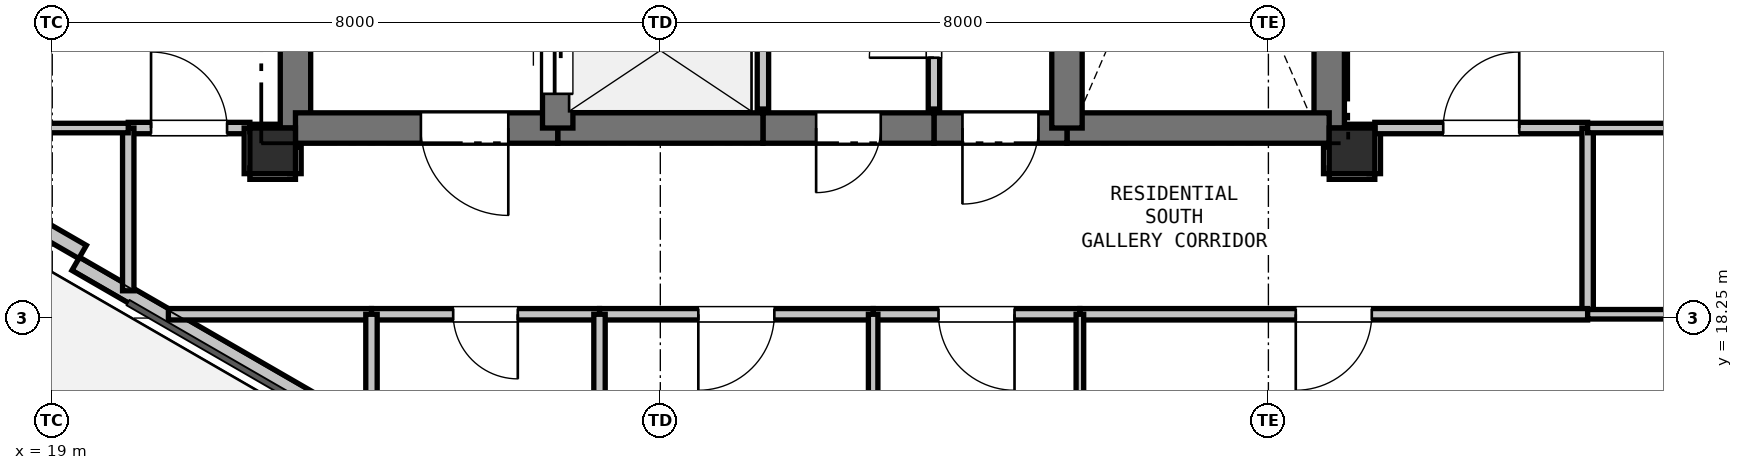
"""IFC4 building model, lengths in metres.
Left out: names, types, materials, properties, quantities, classifications, styles, units other than length and angle.
Written with IfcOpenShell. Run it as: python <this file> out.ifc"""

import sys

from ifc_helpers import new_model, si_unit, direction, frame, frame_2d, origin, origin_2d, place, context, subcontext, project, spatial, rectangle, extrude, element, fill, save


model = new_model("IFC4")
c1 = context("Model", 3, precision=1e-05, world=origin(), true_north=direction((0.0, 1.0)))
c2 = subcontext(c1, "Body", "Model", "MODEL_VIEW")
j1 = project(units=[si_unit("LENGTHUNIT", "METRE"), si_unit("PLANEANGLEUNIT", "RADIAN")], contexts=[c1])
p1 = place(None, origin())
s1 = spatial("IfcSite", under=j1, at=p1, CompositionType="ELEMENT")
p2 = place(p1, origin())
s2 = spatial("IfcBuilding", under=s1, at=p2, CompositionType="ELEMENT")
p3 = place(p2, frame((0.0, 0.0, 211.8)))
s3 = spatial("IfcBuildingStorey", under=s2, at=p3, CompositionType="ELEMENT", Elevation=211.8)
for number, where, z_axis, x_axis in (
    (1, (21.9, 20.45, 0.0), (0.0, 0.0, 1.0), (1.0, 0.0, 0.0)),
    (2, (36.1, 20.45, 0.0), (0.0, 0.0, 1.0), (1.0, 0.0, 0.0)),
):
    element("IfcColumn", number, at=place(p3, frame(where, z_axis=z_axis, x_axis=x_axis)), inside=s3, PredefinedType="COLUMN", context=c2, shape_type="SweptSolid", body=[
        extrude(rectangle(XDim=0.6, YDim=0.6, at=origin_2d()), origin(), (0.0, 0.0, 1.0), 3.3),
    ])
p4 = place(p3, frame((27.102, 14.464, 0.0), z_axis=(0.0, 0.0, 1.0), x_axis=(-0.866020680503, 0.500008180874, 0.0)))
e3 = element("IfcWall", 3, at=p4, inside=s3, PredefinedType="PARAPET", context=c2, shape_type="SweptSolid", body=[
    extrude(rectangle(XDim=8.999, YDim=0.2, at=frame_2d((4.5, 0.0))), origin(), (0.0, 0.0, 1.0), 0.2),
])
p5 = place(p3, frame((19.399, 19.12, 0.0), z_axis=(0.0, 0.0, 1.0), x_axis=(-0.86605165483, 0.499954529098, 0.0)))
e4 = element("IfcWall", 4, at=p5, inside=s3, PredefinedType="PARAPET", context=c2, shape_type="SweptSolid", body=[
    extrude(rectangle(XDim=1.7, YDim=0.2, at=frame_2d((0.85, 0.0))), origin(), (0.0, 0.0, 1.0), 2.69),
])
p6 = place(p3, frame((22.2, 20.75, 0.0), z_axis=(0.0, 0.0, 1.0), x_axis=(0.0, 1.0, 0.0)))
e5 = element("IfcWall", 5, at=p6, inside=s3, PredefinedType="SHEAR", context=c2, shape_type="SweptSolid", body=[
    extrude(rectangle(XDim=4.65, YDim=0.4, at=frame_2d((2.325, 0.0))), origin(), (0.0, 0.0, 1.0), 3.07),
])
p7 = place(p3, frame((35.8, 28.1, 0.0), z_axis=(0.0, 0.0, 1.0), x_axis=(0.0, -1.0, 0.0)))
e6 = element("IfcWall", 6, at=p7, inside=s3, PredefinedType="SHEAR", context=c2, shape_type="SweptSolid", body=[
    extrude(rectangle(XDim=7.35, YDim=0.4, at=frame_2d((3.675, 0.0))), origin(), (0.0, 0.0, 1.0), 3.07),
])
p8 = place(p3, frame((35.8, 20.75, 0.0), z_axis=(0.0, 0.0, 1.0), x_axis=(-1.0, 0.0, 0.0)))
e7 = element("IfcWall", 7, at=p8, inside=s3, PredefinedType="SHEAR", context=c2, shape_type="SweptSolid", body=[
    extrude(rectangle(XDim=3.45, YDim=0.4, at=frame_2d((1.725, 0.0))), origin(), (0.0, 0.0, 1.0), 3.07),
])
p9 = place(p3, frame((32.35, 20.75, 0.0), z_axis=(0.0, 0.0, 1.0), x_axis=(-1.0, 0.0, 0.0)))
e8 = element("IfcWall", 8, at=p9, inside=s3, PredefinedType="SHEAR", context=c2, shape_type="SweptSolid", body=[
    extrude(rectangle(XDim=1.75, YDim=0.4, at=frame_2d((0.875, 0.0))), origin(), (0.0, 0.0, 1.0), 3.07),
])
p10 = place(p9, frame((0.375, 0.0, 0.0)))
e9 = element("IfcOpeningElement", 9, at=p10, cuts=e8, PredefinedType="OPENING", context=c2, shape_type="SweptSolid", body=[
    extrude(rectangle(XDim=1.0, YDim=2.15, at=frame_2d((0.5, 1.075))), frame((0.0, 0.21, 0.0), z_axis=(0.0, -1.0, 0.0), x_axis=(1.0, 0.0, 0.0)), (0.0, 0.0, 1.0), 0.42),
])
p11 = place(p3, frame((30.6, 20.75, 0.0), z_axis=(0.0, 0.0, 1.0), x_axis=(-1.0, 0.0, 0.0)))
e10 = element("IfcWall", 10, at=p11, inside=s3, PredefinedType="SHEAR", context=c2, shape_type="SweptSolid", body=[
    extrude(rectangle(XDim=2.25, YDim=0.4, at=frame_2d((1.125, 0.0))), origin(), (0.0, 0.0, 1.0), 3.07),
])
p12 = place(p11, frame((0.7, 0.0, 0.0)))
e11 = element("IfcOpeningElement", 11, at=p12, cuts=e10, PredefinedType="OPENING", context=c2, shape_type="SweptSolid", body=[
    extrude(rectangle(XDim=0.85, YDim=2.1, at=frame_2d((0.425, 1.05))), frame((0.0, 0.21, 0.0), z_axis=(0.0, -1.0, 0.0), x_axis=(1.0, 0.0, 0.0)), (0.0, 0.0, 1.0), 0.42),
])
p13 = place(p3, frame((28.35, 20.75, 0.0), z_axis=(0.0, 0.0, 1.0), x_axis=(-1.0, 0.0, 0.0)))
e12 = element("IfcWall", 12, at=p13, inside=s3, PredefinedType="SHEAR", context=c2, shape_type="SweptSolid", body=[
    extrude(rectangle(XDim=2.7, YDim=0.4, at=frame_2d((1.35, 0.0))), origin(), (0.0, 0.0, 1.0), 3.07),
])
p14 = place(p3, frame((25.65, 20.75, 0.0), z_axis=(0.0, 0.0, 1.0), x_axis=(-1.0, 0.0, 0.0)))
e13 = element("IfcWall", 13, at=p14, inside=s3, PredefinedType="SHEAR", context=c2, shape_type="SweptSolid", body=[
    extrude(rectangle(XDim=3.45, YDim=0.4, at=frame_2d((1.725, 0.0))), origin(), (0.0, 0.0, 1.0), 3.07),
])
p15 = place(p14, frame((0.65, 0.0, 0.0)))
e14 = element("IfcOpeningElement", 14, at=p15, cuts=e13, PredefinedType="OPENING", context=c2, shape_type="SweptSolid", body=[
    extrude(rectangle(XDim=1.15, YDim=2.15, at=frame_2d((0.575, 1.075))), frame((0.0, 0.21, 0.0), z_axis=(0.0, -1.0, 0.0), x_axis=(1.0, 0.0, 0.0)), (0.0, 0.0, 1.0), 0.42),
])
p16 = place(p3, frame((25.65, 20.75, 0.0), z_axis=(0.0, 0.0, 1.0), x_axis=(0.0, 1.0, 0.0)))
e15 = element("IfcWall", 15, at=p16, inside=s3, PredefinedType="SHEAR", context=c2, shape_type="SweptSolid", body=[
    extrude(rectangle(XDim=2.0, YDim=0.4, at=frame_2d((1.0, 0.0))), origin(), (0.0, 0.0, 1.0), 3.07),
])
p17 = place(p16, frame((0.45, 0.0, 0.0)))
e16 = element("IfcOpeningElement", 16, at=p17, cuts=e15, PredefinedType="OPENING", context=c2, shape_type="SweptSolid", body=[
    extrude(rectangle(XDim=1.1, YDim=2.15, at=frame_2d((0.55, 1.075))), frame((0.0, 0.21, 0.0), z_axis=(0.0, -1.0, 0.0), x_axis=(1.0, 0.0, 0.0)), (0.0, 0.0, 1.0), 0.42),
])
p18 = place(p3, frame((32.35, 20.75, 0.0), z_axis=(0.0, 0.0, 1.0), x_axis=(0.0, 1.0, 0.0)))
e17 = element("IfcWall", 17, at=p18, inside=s3, PredefinedType="SHEAR", context=c2, shape_type="SweptSolid", body=[
    extrude(rectangle(XDim=4.8, YDim=0.4, at=frame_2d((2.4, 0.0))), origin(), (0.0, 0.0, 1.0), 3.07),
])
p19 = place(p3, frame((28.35, 23.2, 0.0), z_axis=(0.0, 0.0, 1.0), x_axis=(0.0, -1.0, 0.0)))
e18 = element("IfcWall", 18, at=p19, inside=s3, PredefinedType="PARTITIONING", context=c2, shape_type="SweptSolid", body=[
    extrude(rectangle(XDim=2.2, YDim=0.15, at=frame_2d((1.1, 0.0))), origin(), (0.0, 0.0, 1.0), 3.07),
])
p20 = place(p3, frame((30.6, 21.0, 0.0), z_axis=(0.0, 0.0, 1.0), x_axis=(0.0, 1.0, 0.0)))
e19 = element("IfcWall", 19, at=p20, inside=s3, PredefinedType="PARTITIONING", context=c2, shape_type="SweptSolid", body=[
    extrude(rectangle(XDim=2.2, YDim=0.15, at=frame_2d((1.1, 0.0))), origin(), (0.0, 0.0, 1.0), 3.07),
])
p21 = place(p20, frame((0.675, 0.0, 0.0)))
e20 = element("IfcOpeningElement", 20, at=p21, cuts=e19, PredefinedType="OPENING", context=c2, shape_type="SweptSolid", body=[
    extrude(rectangle(XDim=0.85, YDim=2.1, at=frame_2d((0.425, 1.05))), frame((0.0, 0.085, 0.0), z_axis=(0.0, -1.0, 0.0), x_axis=(1.0, 0.0, 0.0)), (0.0, 0.0, 1.0), 0.17),
])
p22 = place(p3, frame((20.0, 20.75, 0.0), z_axis=(0.0, 0.0, 1.0), x_axis=(1.0, 0.0, 0.0)))
e21 = element("IfcWall", 21, at=p22, inside=s3, PredefinedType="PARTITIONING", context=c2, shape_type="SweptSolid", body=[
    extrude(rectangle(XDim=1.6, YDim=0.15, at=frame_2d((0.8, 0.0))), origin(), (0.0, 0.0, 1.0), 2.518),
])
p23 = place(p22, frame((0.3, 0.0, 0.0)))
e22 = element("IfcOpeningElement", 22, at=p23, cuts=e21, PredefinedType="OPENING", context=c2, shape_type="SweptSolid", body=[
    extrude(rectangle(XDim=1.0, YDim=2.15, at=frame_2d((0.5, 1.075))), frame((0.0, 0.085, 0.0), z_axis=(0.0, -1.0, 0.0), x_axis=(1.0, 0.0, 0.0)), (0.0, 0.0, 1.0), 0.17),
])
p24 = place(p3, frame((21.6, 20.75, 0.0), z_axis=(0.0, 0.0, 1.0), x_axis=(0.0, -1.0, 0.0)))
e23 = element("IfcWall", 23, at=p24, inside=s3, PredefinedType="PARTITIONING", context=c2, shape_type="SweptSolid", body=[
    extrude(rectangle(XDim=0.6, YDim=0.15, at=frame_2d((0.3, 0.0))), origin(), (0.0, 0.0, 1.0), 2.518),
])
p25 = place(p3, frame((21.6, 20.15, 0.0), z_axis=(0.0, 0.0, 1.0), x_axis=(1.0, 0.0, 0.0)))
e24 = element("IfcWall", 24, at=p25, inside=s3, PredefinedType="PARTITIONING", context=c2, shape_type="SweptSolid", body=[
    extrude(rectangle(XDim=0.6, YDim=0.15, at=frame_2d((0.3, 0.0))), origin(), (0.0, 0.0, 1.0), 2.518),
])
p26 = place(p3, frame((22.2, 20.15, 0.0), z_axis=(0.0, 0.0, 1.0), x_axis=(0.0, 1.0, 0.0)))
e25 = element("IfcWall", 25, at=p26, inside=s3, PredefinedType="PARTITIONING", context=c2, shape_type="SweptSolid", body=[
    extrude(rectangle(XDim=0.35, YDim=0.15, at=frame_2d((0.175, 0.0))), origin(), (0.0, 0.0, 1.0), 2.518),
])
p27 = place(p3, frame((35.8, 20.5, 0.0), z_axis=(0.0, 0.0, 1.0), x_axis=(0.0, -1.0, 0.0)))
e26 = element("IfcWall", 26, at=p27, inside=s3, PredefinedType="PARTITIONING", context=c2, shape_type="SweptSolid", body=[
    extrude(rectangle(XDim=0.35, YDim=0.15, at=frame_2d((0.175, 0.0))), origin(), (0.0, 0.0, 1.0), 2.595),
])
p28 = place(p3, frame((35.8, 20.15, 0.0), z_axis=(0.0, 0.0, 1.0), x_axis=(1.0, 0.0, 0.0)))
e27 = element("IfcWall", 27, at=p28, inside=s3, PredefinedType="PARTITIONING", context=c2, shape_type="SweptSolid", body=[
    extrude(rectangle(XDim=0.6, YDim=0.15, at=frame_2d((0.3, 0.0))), origin(), (0.0, 0.0, 1.0), 2.518),
])
p29 = place(p3, frame((36.4, 20.15, 0.0), z_axis=(0.0, 0.0, 1.0), x_axis=(0.0, 1.0, 0.0)))
e28 = element("IfcWall", 28, at=p29, inside=s3, PredefinedType="PARTITIONING", context=c2, shape_type="SweptSolid", body=[
    extrude(rectangle(XDim=0.6, YDim=0.15, at=frame_2d((0.3, 0.0))), origin(), (0.0, 0.0, 1.0), 2.518),
])
p30 = place(p3, frame((36.4, 20.75, 0.0), z_axis=(0.0, 0.0, 1.0), x_axis=(1.0, 0.0, 0.0)))
e29 = element("IfcWall", 29, at=p30, inside=s3, PredefinedType="PARTITIONING", context=c2, shape_type="SweptSolid", body=[
    extrude(rectangle(XDim=2.8, YDim=0.15, at=frame_2d((1.4, 0.0))), origin(), (0.0, 0.0, 1.0), 3.07),
])
p31 = place(p30, frame((0.9, 0.0, 0.0)))
e30 = element("IfcOpeningElement", 30, at=p31, cuts=e29, PredefinedType="OPENING", context=c2, shape_type="SweptSolid", body=[
    extrude(rectangle(XDim=1.0, YDim=2.15, at=frame_2d((0.5, 1.075))), frame((0.0, 0.085, 0.0), z_axis=(0.0, -1.0, 0.0), x_axis=(1.0, 0.0, 0.0)), (0.0, 0.0, 1.0), 0.17),
])
p32 = place(p3, frame((39.2, 20.75, 0.0), z_axis=(0.0, 0.0, 1.0), x_axis=(0.0, -1.0, 0.0)))
e31 = element("IfcWall", 31, at=p32, inside=s3, PredefinedType="PARTITIONING", context=c2, shape_type="SweptSolid", body=[
    extrude(rectangle(XDim=2.45, YDim=0.15, at=frame_2d((1.225, 0.0))), origin(), (0.0, 0.0, 1.0), 3.07),
])
p33 = place(p3, frame((39.2, 18.3, 0.0), z_axis=(0.0, 0.0, 1.0), x_axis=(-1.0, 0.0, 0.0)))
e32 = element("IfcWall", 32, at=p33, inside=s3, PredefinedType="PARTITIONING", context=c2, shape_type="SweptSolid", body=[
    extrude(rectangle(XDim=6.68, YDim=0.15, at=frame_2d((3.34, 0.0))), origin(), (0.0, 0.0, 1.0), 2.518),
])
p34 = place(p33, frame((2.84, 0.0, 0.0)))
e33 = element("IfcOpeningElement", 33, at=p34, cuts=e32, PredefinedType="OPENING", context=c2, shape_type="SweptSolid", body=[
    extrude(rectangle(XDim=1.0, YDim=2.15, at=frame_2d((0.5, 1.075))), frame((0.0, 0.085, 0.0), z_axis=(0.0, -1.0, 0.0), x_axis=(1.0, 0.0, 0.0)), (0.0, 0.0, 1.0), 0.17),
])
p35 = place(p3, frame((32.52, 18.3, 0.0), z_axis=(0.0, 0.0, 1.0), x_axis=(-1.0, 0.0, 0.0)))
e34 = element("IfcWall", 34, at=p35, inside=s3, PredefinedType="PARTITIONING", context=c2, shape_type="SweptSolid", body=[
    extrude(rectangle(XDim=2.72, YDim=0.15, at=frame_2d((1.36, 0.0))), origin(), (0.0, 0.0, 1.0), 3.07),
])
p36 = place(p35, frame((0.86, 0.0, 0.0)))
e35 = element("IfcOpeningElement", 35, at=p36, cuts=e34, PredefinedType="OPENING", context=c2, shape_type="SweptSolid", body=[
    extrude(rectangle(XDim=1.0, YDim=2.15, at=frame_2d((0.5, 1.075))), frame((0.0, 0.085, 0.0), z_axis=(0.0, -1.0, 0.0), x_axis=(1.0, 0.0, 0.0)), (0.0, 0.0, 1.0), 0.17),
])
p37 = place(p3, frame((29.8, 18.3, 0.0), z_axis=(0.0, 0.0, 1.0), x_axis=(-1.0, 0.0, 0.0)))
e36 = element("IfcWall", 36, at=p37, inside=s3, PredefinedType="PARTITIONING", context=c2, shape_type="SweptSolid", body=[
    extrude(rectangle(XDim=3.6, YDim=0.15, at=frame_2d((1.8, 0.0))), origin(), (0.0, 0.0, 1.0), 3.07),
])
p38 = place(p37, frame((1.3, 0.0, 0.0)))
e37 = element("IfcOpeningElement", 37, at=p38, cuts=e36, PredefinedType="OPENING", context=c2, shape_type="SweptSolid", body=[
    extrude(rectangle(XDim=1.0, YDim=2.15, at=frame_2d((0.5, 1.075))), frame((0.0, 0.085, 0.0), z_axis=(0.0, -1.0, 0.0), x_axis=(1.0, 0.0, 0.0)), (0.0, 0.0, 1.0), 0.17),
])
p39 = place(p3, frame((26.2, 18.3, 0.0), z_axis=(0.0, 0.0, 1.0), x_axis=(-1.0, 0.0, 0.0)))
e38 = element("IfcWall", 38, at=p39, inside=s3, PredefinedType="PARTITIONING", context=c2, shape_type="SweptSolid", body=[
    extrude(rectangle(XDim=3.0, YDim=0.15, at=frame_2d((1.5, 0.0))), origin(), (0.0, 0.0, 1.0), 2.518),
])
p40 = place(p39, frame((1.075, 0.0, 0.0)))
e39 = element("IfcOpeningElement", 39, at=p40, cuts=e38, PredefinedType="OPENING", context=c2, shape_type="SweptSolid", body=[
    extrude(rectangle(XDim=0.85, YDim=2.1, at=frame_2d((0.425, 1.05))), frame((0.0, 0.085, 0.0), z_axis=(0.0, -1.0, 0.0), x_axis=(1.0, 0.0, 0.0)), (0.0, 0.0, 1.0), 0.17),
])
p41 = place(p3, frame((23.2, 18.3, 0.0), z_axis=(0.0, 0.0, 1.0), x_axis=(-1.0, 0.0, 0.0)))
e40 = element("IfcWall", 40, at=p41, inside=s3, PredefinedType="PARTITIONING", context=c2, shape_type="SweptSolid", body=[
    extrude(rectangle(XDim=2.672, YDim=0.15, at=frame_2d((1.336, 0.0))), origin(), (0.0, 0.0, 1.0), 2.365),
])
p42 = place(p3, frame((20.0, 18.609, 0.0), z_axis=(0.0, 0.0, 1.0), x_axis=(0.0, 1.0, 0.0)))
e41 = element("IfcWall", 41, at=p42, inside=s3, PredefinedType="PARTITIONING", context=c2, shape_type="SweptSolid", body=[
    extrude(rectangle(XDim=2.141, YDim=0.15, at=frame_2d((1.071, 0.0))), origin(), (0.0, 0.0, 1.0), 2.365),
])
p43 = place(p3, frame((21.95, 20.75, 0.0), z_axis=(0.0, 0.0, 1.0), x_axis=(-1.0, 0.0, 0.0)))
e42 = element("IfcWall", 42, at=p43, inside=s3, PredefinedType="PARTITIONING", context=c2, shape_type="SweptSolid", body=[
    extrude(rectangle(XDim=0.35, YDim=0.1, at=frame_2d((0.175, 0.0))), origin(), (0.0, 0.0, 1.0), 2.595),
])
p44 = place(p3, frame((20.0, 20.75, 0.0), z_axis=(0.0, 0.0, 1.0), x_axis=(-1.0, 0.0, 0.0)))
e43 = element("IfcWall", 43, at=p44, inside=s3, PredefinedType="PARTITIONING", context=c2, shape_type="SweptSolid", body=[
    extrude(rectangle(XDim=3.536, YDim=0.125, at=frame_2d((1.768, 0.0))), origin(), (0.0, 0.0, 1.0), 2.365),
])
p45 = place(p3, frame((40.284, 20.75, 0.0), z_axis=(0.0, 0.0, 1.0), x_axis=(-1.0, 0.0, 0.0)))
e44 = element("IfcWall", 44, at=p45, inside=s3, PredefinedType="PARTITIONING", context=c2, shape_type="SweptSolid", body=[
    extrude(rectangle(XDim=1.084, YDim=0.125, at=frame_2d((0.542, 0.0))), origin(), (0.0, 0.0, 1.0), 2.365),
])
p46 = place(p3, frame((36.4, 20.75, 0.0), z_axis=(0.0, 0.0, 1.0), x_axis=(-1.0, 0.0, 0.0)))
e45 = element("IfcWall", 45, at=p46, inside=s3, PredefinedType="PARTITIONING", context=c2, shape_type="SweptSolid", body=[
    extrude(rectangle(XDim=0.35, YDim=0.1, at=frame_2d((0.175, 0.0))), origin(), (0.0, 0.0, 1.0), 2.595),
])
p47 = place(p3, frame((26.2, 18.3, 0.0), z_axis=(0.0, 0.0, 1.0), x_axis=(0.0, -1.0, 0.0)))
e46 = element("IfcWall", 46, at=p47, inside=s3, PredefinedType="PARTITIONING", context=c2, shape_type="SweptSolid", body=[
    extrude(rectangle(XDim=2.3, YDim=0.15, at=frame_2d((1.15, 0.0))), origin(), (0.0, 0.0, 1.0), 2.518),
])
p48 = place(p3, frame((23.2, 16.761, 0.0), z_axis=(0.0, 0.0, 1.0), x_axis=(0.0, 1.0, 0.0)))
e47 = element("IfcWall", 47, at=p48, inside=s3, PredefinedType="PARTITIONING", context=c2, shape_type="SweptSolid", body=[
    extrude(rectangle(XDim=1.539, YDim=0.15, at=frame_2d((0.769, 0.0))), origin(), (0.0, 0.0, 1.0), 2.365),
])
p49 = place(p3, frame((29.8, 18.3, 0.0), z_axis=(0.0, 0.0, 1.0), x_axis=(0.0, -1.0, 0.0)))
e48 = element("IfcWall", 48, at=p49, inside=s3, PredefinedType="PARTITIONING", context=c2, shape_type="SweptSolid", body=[
    extrude(rectangle(XDim=2.3, YDim=0.125, at=frame_2d((1.15, 0.0))), origin(), (0.0, 0.0, 1.0), 3.07),
])
p50 = place(p3, frame((32.52, 18.3, 0.0), z_axis=(0.0, 0.0, 1.0), x_axis=(0.0, -1.0, 0.0)))
e49 = element("IfcWall", 49, at=p50, inside=s3, PredefinedType="PARTITIONING", context=c2, shape_type="SweptSolid", body=[
    extrude(rectangle(XDim=6.806, YDim=0.1, at=frame_2d((3.403, 0.0))), origin(), (0.0, 0.0, 1.0), 2.365),
])
p51 = place(p3, frame((39.2, 18.3, 0.0), z_axis=(0.0, 0.0, 1.0), x_axis=(1.0, 0.0, 0.0)))
e50 = element("IfcWall", 50, at=p51, inside=s3, PredefinedType="PARTITIONING", context=c2, shape_type="SweptSolid", body=[
    extrude(rectangle(XDim=1.252, YDim=0.125, at=frame_2d((0.626, 0.0))), origin(), (0.0, 0.0, 1.0), 2.365),
])
p52 = place(p10, origin())
e51 = element("IfcDoor", 51, at=p52, inside=s3, OperationType="SINGLE_SWING_RIGHT", PredefinedType="DOOR", context=c2, shape_type="SweptSolid", body=[
    extrude(rectangle(XDim=1.0, YDim=2.15, at=frame_2d((0.5, 1.075))), frame((0.0, 0.025, 0.0), z_axis=(0.0, -1.0, 0.0), x_axis=(1.0, 0.0, 0.0)), (0.0, 0.0, 1.0), 0.05),
])
fill(e9, e51)
p53 = place(p17, origin())
e52 = element("IfcDoor", 52, at=p53, inside=s3, OperationType="SLIDING_TO_LEFT", PredefinedType="DOOR", context=c2, shape_type="SweptSolid", body=[
    extrude(rectangle(XDim=1.1, YDim=2.15, at=frame_2d((0.55, 1.075))), frame((0.0, 0.025, 0.0), z_axis=(0.0, -1.0, 0.0), x_axis=(1.0, 0.0, 0.0)), (0.0, 0.0, 1.0), 0.05),
])
fill(e16, e52)
p54 = place(p15, origin())
e53 = element("IfcDoor", 53, at=p54, inside=s3, OperationType="SINGLE_SWING_LEFT", PredefinedType="DOOR", context=c2, shape_type="SweptSolid", body=[
    extrude(rectangle(XDim=1.15, YDim=2.15, at=frame_2d((0.575, 1.075))), frame((0.0, 0.025, 0.0), z_axis=(0.0, -1.0, 0.0), x_axis=(1.0, 0.0, 0.0)), (0.0, 0.0, 1.0), 0.05),
])
fill(e14, e53)
p55 = place(p21, origin())
e54 = element("IfcDoor", 54, at=p55, inside=s3, OperationType="SINGLE_SWING_LEFT", PredefinedType="DOOR", context=c2, shape_type="SweptSolid", body=[
    extrude(rectangle(XDim=0.85, YDim=2.1, at=frame_2d((0.425, 1.05))), frame((0.0, 0.025, 0.0), z_axis=(0.0, -1.0, 0.0), x_axis=(1.0, 0.0, 0.0)), (0.0, 0.0, 1.0), 0.05),
])
fill(e20, e54)
p56 = place(p12, origin())
e55 = element("IfcDoor", 55, at=p56, inside=s3, OperationType="SINGLE_SWING_RIGHT", PredefinedType="DOOR", context=c2, shape_type="SweptSolid", body=[
    extrude(rectangle(XDim=0.85, YDim=2.1, at=frame_2d((0.425, 1.05))), frame((0.0, 0.025, 0.0), z_axis=(0.0, -1.0, 0.0), x_axis=(1.0, 0.0, 0.0)), (0.0, 0.0, 1.0), 0.05),
])
fill(e11, e55)
p57 = place(p23, origin())
e56 = element("IfcDoor", 56, at=p57, inside=s3, OperationType="SINGLE_SWING_LEFT", PredefinedType="DOOR", context=c2, shape_type="SweptSolid", body=[
    extrude(rectangle(XDim=1.0, YDim=2.15, at=frame_2d((0.5, 1.075))), frame((0.0, 0.025, 0.0), z_axis=(0.0, -1.0, 0.0), x_axis=(1.0, 0.0, 0.0)), (0.0, 0.0, 1.0), 0.05),
])
fill(e22, e56)
p58 = place(p31, origin())
e57 = element("IfcDoor", 57, at=p58, inside=s3, OperationType="SINGLE_SWING_RIGHT", PredefinedType="DOOR", context=c2, shape_type="SweptSolid", body=[
    extrude(rectangle(XDim=1.0, YDim=2.15, at=frame_2d((0.5, 1.075))), frame((0.0, 0.025, 0.0), z_axis=(0.0, -1.0, 0.0), x_axis=(1.0, 0.0, 0.0)), (0.0, 0.0, 1.0), 0.05),
])
fill(e30, e57)
p59 = place(p40, origin())
e58 = element("IfcDoor", 58, at=p59, inside=s3, OperationType="SINGLE_SWING_LEFT", PredefinedType="DOOR", context=c2, shape_type="SweptSolid", body=[
    extrude(rectangle(XDim=0.85, YDim=2.1, at=frame_2d((0.425, 1.05))), frame((0.0, 0.025, 0.0), z_axis=(0.0, -1.0, 0.0), x_axis=(1.0, 0.0, 0.0)), (0.0, 0.0, 1.0), 0.05),
])
fill(e39, e58)
p60 = place(p38, origin())
e59 = element("IfcDoor", 59, at=p60, inside=s3, OperationType="SINGLE_SWING_RIGHT", PredefinedType="DOOR", context=c2, shape_type="SweptSolid", body=[
    extrude(rectangle(XDim=1.0, YDim=2.15, at=frame_2d((0.5, 1.075))), frame((0.0, 0.025, 0.0), z_axis=(0.0, -1.0, 0.0), x_axis=(1.0, 0.0, 0.0)), (0.0, 0.0, 1.0), 0.05),
])
fill(e37, e59)
p61 = place(p36, origin())
e60 = element("IfcDoor", 60, at=p61, inside=s3, OperationType="SINGLE_SWING_LEFT", PredefinedType="DOOR", context=c2, shape_type="SweptSolid", body=[
    extrude(rectangle(XDim=1.0, YDim=2.15, at=frame_2d((0.5, 1.075))), frame((0.0, 0.025, 0.0), z_axis=(0.0, -1.0, 0.0), x_axis=(1.0, 0.0, 0.0)), (0.0, 0.0, 1.0), 0.05),
])
fill(e35, e60)
p62 = place(p34, origin())
e61 = element("IfcDoor", 61, at=p62, inside=s3, OperationType="SINGLE_SWING_RIGHT", PredefinedType="DOOR", context=c2, shape_type="SweptSolid", body=[
    extrude(rectangle(XDim=1.0, YDim=2.15, at=frame_2d((0.5, 1.075))), frame((0.0, 0.025, 0.0), z_axis=(0.0, -1.0, 0.0), x_axis=(1.0, 0.0, 0.0)), (0.0, 0.0, 1.0), 0.05),
])
fill(e33, e61)
save(model, sys.argv[1])
